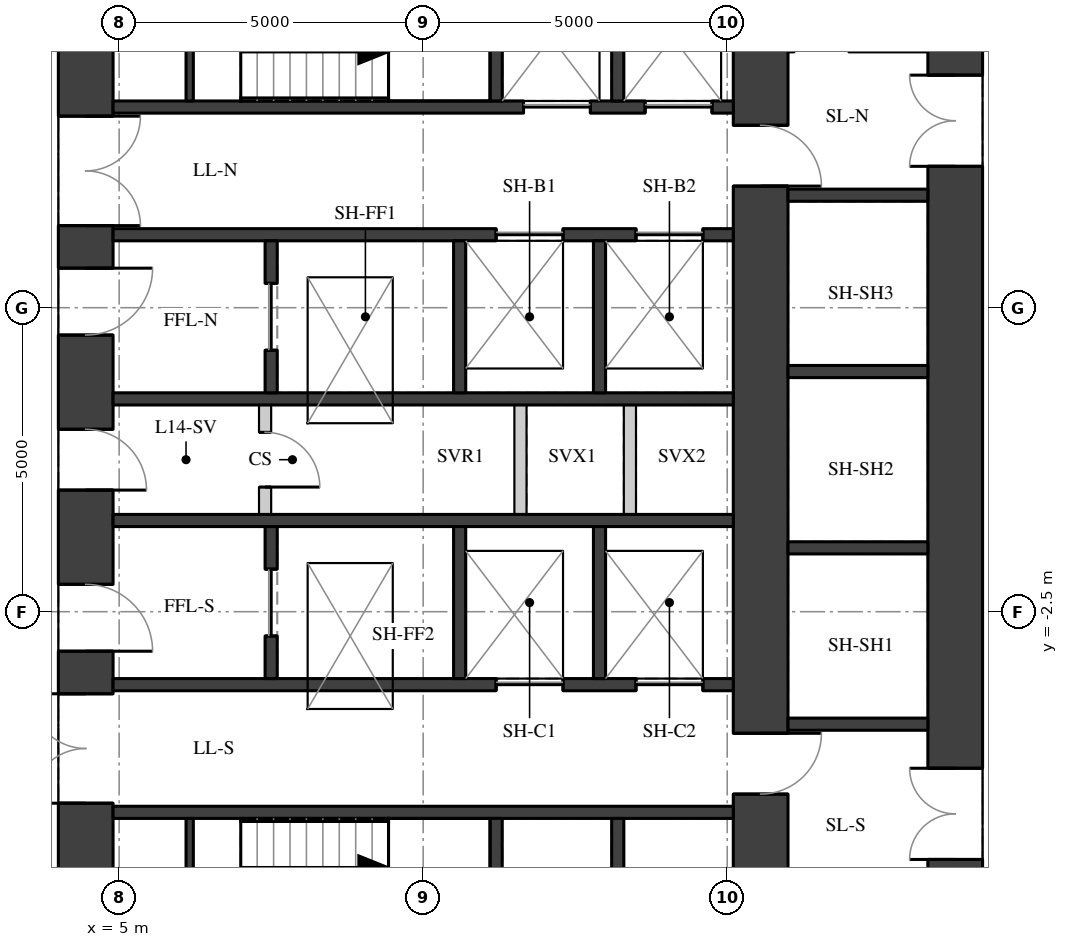
"""IFC4 building model, lengths in metres.
Left out: names, types, materials, properties, quantities, classifications, styles, units other than length and angle.
Written with IfcOpenShell. Run it as: python <this file> out.ifc"""

import sys

from ifc_helpers import new_model, si_unit, direction, frame, frame_2d, origin, place, context, subcontext, project, spatial, rectangle, extrude, element, fill, save


model = new_model("IFC4")
c1 = context("Model", 3, precision=1e-05, world=origin(), true_north=direction((0.0, 1.0)))
c2 = subcontext(c1, "Body", "Model", "MODEL_VIEW")
j1 = project(units=[si_unit("LENGTHUNIT", "METRE"), si_unit("PLANEANGLEUNIT", "RADIAN")], contexts=[c1])
p1 = place(None, origin())
s1 = spatial("IfcSite", under=j1, at=p1, CompositionType="ELEMENT")
p2 = place(p1, origin())
s2 = spatial("IfcBuilding", under=s1, at=p2, CompositionType="ELEMENT")
p3 = place(p2, frame((0.0, 0.0, 54.7)))
s3 = spatial("IfcBuildingStorey", under=s2, at=p3, CompositionType="ELEMENT", Elevation=54.7)
p4 = place(p3, frame((4.45, -11.1, 0.0), z_axis=(0.0, 0.0, 1.0), x_axis=(0.0, 1.0, 0.0)))
e1 = element("IfcWall", 1, at=p4, inside=s3, PredefinedType="SHEAR", context=c2, shape_type="SweptSolid", body=[
    extrude(rectangle(XDim=22.2, YDim=0.9, at=frame_2d((11.1, 0.0))), origin(), (0.0, 0.0, 1.0), 3.02),
])
p5 = place(p4, frame((2.35, 0.0, 0.0)))
e2 = element("IfcOpeningElement", 2, at=p5, cuts=e1, PredefinedType="OPENING", context=c2, shape_type="SweptSolid", body=[
    extrude(rectangle(XDim=1.5, YDim=2.1, at=frame_2d((0.75, 1.05))), frame((0.0, 0.46, 0.0), z_axis=(0.0, -1.0, 0.0), x_axis=(1.0, 0.0, 0.0)), (0.0, 0.0, 1.0), 0.92),
])
p6 = place(p4, frame((5.45, 0.0, 0.0)))
e3 = element("IfcOpeningElement", 3, at=p6, cuts=e1, PredefinedType="OPENING", context=c2, shape_type="SweptSolid", body=[
    extrude(rectangle(XDim=1.8, YDim=2.1, at=frame_2d((0.9, 1.05))), frame((0.0, 0.46, 0.0), z_axis=(0.0, -1.0, 0.0), x_axis=(1.0, 0.0, 0.0)), (0.0, 0.0, 1.0), 0.92),
])
p7 = place(p4, frame((7.95, 0.0, 0.0)))
e4 = element("IfcOpeningElement", 4, at=p7, cuts=e1, PredefinedType="OPENING", context=c2, shape_type="SweptSolid", body=[
    extrude(rectangle(XDim=1.1, YDim=2.1, at=frame_2d((0.55, 1.05))), frame((0.0, 0.46, 0.0), z_axis=(0.0, -1.0, 0.0), x_axis=(1.0, 0.0, 0.0)), (0.0, 0.0, 1.0), 0.92),
])
p8 = place(p4, frame((10.6, 0.0, 0.0)))
e5 = element("IfcOpeningElement", 5, at=p8, cuts=e1, PredefinedType="OPENING", context=c2, shape_type="SweptSolid", body=[
    extrude(rectangle(XDim=1.0, YDim=2.1, at=frame_2d((0.5, 1.05))), frame((0.0, 0.46, 0.0), z_axis=(0.0, -1.0, 0.0), x_axis=(1.0, 0.0, 0.0)), (0.0, 0.0, 1.0), 0.92),
])
p9 = place(p4, frame((13.15, 0.0, 0.0)))
e6 = element("IfcOpeningElement", 6, at=p9, cuts=e1, PredefinedType="OPENING", context=c2, shape_type="SweptSolid", body=[
    extrude(rectangle(XDim=1.1, YDim=2.1, at=frame_2d((0.55, 1.05))), frame((0.0, 0.46, 0.0), z_axis=(0.0, -1.0, 0.0), x_axis=(1.0, 0.0, 0.0)), (0.0, 0.0, 1.0), 0.92),
])
p10 = place(p4, frame((14.95, 0.0, 0.0)))
e7 = element("IfcOpeningElement", 7, at=p10, cuts=e1, PredefinedType="OPENING", context=c2, shape_type="SweptSolid", body=[
    extrude(rectangle(XDim=1.8, YDim=2.1, at=frame_2d((0.9, 1.05))), frame((0.0, 0.46, 0.0), z_axis=(0.0, -1.0, 0.0), x_axis=(1.0, 0.0, 0.0)), (0.0, 0.0, 1.0), 0.92),
])
p11 = place(p4, frame((18.35, 0.0, 0.0)))
e8 = element("IfcOpeningElement", 8, at=p11, cuts=e1, PredefinedType="OPENING", context=c2, shape_type="SweptSolid", body=[
    extrude(rectangle(XDim=1.5, YDim=2.1, at=frame_2d((0.75, 1.05))), frame((0.0, 0.46, 0.0), z_axis=(0.0, -1.0, 0.0), x_axis=(1.0, 0.0, 0.0)), (0.0, 0.0, 1.0), 0.92),
])
p12 = place(p3, frame((18.75, -11.1, 0.0), z_axis=(0.0, 0.0, 1.0), x_axis=(0.0, 1.0, 0.0)))
e9 = element("IfcWall", 9, at=p12, inside=s3, PredefinedType="SHEAR", context=c2, shape_type="SweptSolid", body=[
    extrude(rectangle(XDim=22.2, YDim=0.9, at=frame_2d((11.1, 0.0))), origin(), (0.0, 0.0, 1.0), 3.02),
])
p13 = place(p12, frame((15.925, 0.0, 0.0)))
e10 = element("IfcOpeningElement", 10, at=p13, cuts=e9, PredefinedType="OPENING", context=c2, shape_type="SweptSolid", body=[
    extrude(rectangle(XDim=1.5, YDim=2.1, at=frame_2d((0.75, 1.05))), frame((0.0, 0.46, 0.0), z_axis=(0.0, -1.0, 0.0), x_axis=(1.0, 0.0, 0.0)), (0.0, 0.0, 1.0), 0.92),
])
p14 = place(p12, frame((4.525, 0.0, 0.0)))
e11 = element("IfcOpeningElement", 11, at=p14, cuts=e9, PredefinedType="OPENING", context=c2, shape_type="SweptSolid", body=[
    extrude(rectangle(XDim=1.5, YDim=2.1, at=frame_2d((0.75, 1.05))), frame((0.0, 0.46, 0.0), z_axis=(0.0, -1.0, 0.0), x_axis=(1.0, 0.0, 0.0)), (0.0, 0.0, 1.0), 0.92),
])
p15 = place(p3, frame((15.55, -11.1, 0.0), z_axis=(0.0, 0.0, 1.0), x_axis=(0.0, 1.0, 0.0)))
e12 = element("IfcWall", 12, at=p15, inside=s3, PredefinedType="SHEAR", context=c2, shape_type="SweptSolid", body=[
    extrude(rectangle(XDim=22.2, YDim=0.9, at=frame_2d((11.1, 0.0))), origin(), (0.0, 0.0, 1.0), 3.02),
])
p16 = place(p15, frame((15.6, 0.0, 0.0)))
e13 = element("IfcOpeningElement", 13, at=p16, cuts=e12, PredefinedType="OPENING", context=c2, shape_type="SweptSolid", body=[
    extrude(rectangle(XDim=1.0, YDim=2.1, at=frame_2d((0.5, 1.05))), frame((0.0, 0.46, 0.0), z_axis=(0.0, -1.0, 0.0), x_axis=(1.0, 0.0, 0.0)), (0.0, 0.0, 1.0), 0.92),
])
p17 = place(p15, frame((5.6, 0.0, 0.0)))
e14 = element("IfcOpeningElement", 14, at=p17, cuts=e12, PredefinedType="OPENING", context=c2, shape_type="SweptSolid", body=[
    extrude(rectangle(XDim=1.0, YDim=2.1, at=frame_2d((0.5, 1.05))), frame((0.0, 0.46, 0.0), z_axis=(0.0, -1.0, 0.0), x_axis=(1.0, 0.0, 0.0)), (0.0, 0.0, 1.0), 0.92),
])
p18 = place(p3, frame((4.9, 5.8, 0.0), z_axis=(0.0, 0.0, 1.0), x_axis=(1.0, 0.0, 0.0)))
e15 = element("IfcWall", 15, at=p18, inside=s3, PredefinedType="SHEAR", context=c2, shape_type="SweptSolid", body=[
    extrude(rectangle(XDim=10.2, YDim=0.2, at=frame_2d((5.1, 0.0))), origin(), (0.0, 0.0, 1.0), 3.02),
])
p19 = place(p18, frame((6.75, 0.0, 0.0)))
e16 = element("IfcOpeningElement", 16, at=p19, cuts=e15, PredefinedType="OPENING", context=c2, shape_type="SweptSolid", body=[
    extrude(rectangle(XDim=1.1, YDim=2.1, at=frame_2d((0.55, 1.05))), frame((0.0, 0.11, 0.0), z_axis=(0.0, -1.0, 0.0), x_axis=(1.0, 0.0, 0.0)), (0.0, 0.0, 1.0), 0.22),
])
p20 = place(p18, frame((8.75, 0.0, 0.0)))
e17 = element("IfcOpeningElement", 17, at=p20, cuts=e15, PredefinedType="OPENING", context=c2, shape_type="SweptSolid", body=[
    extrude(rectangle(XDim=1.1, YDim=2.1, at=frame_2d((0.55, 1.05))), frame((0.0, 0.11, 0.0), z_axis=(0.0, -1.0, 0.0), x_axis=(1.0, 0.0, 0.0)), (0.0, 0.0, 1.0), 0.22),
])
p21 = place(p3, frame((4.9, 3.7, 0.0), z_axis=(0.0, 0.0, 1.0), x_axis=(1.0, 0.0, 0.0)))
e18 = element("IfcWall", 18, at=p21, inside=s3, PredefinedType="SHEAR", context=c2, shape_type="SweptSolid", body=[
    extrude(rectangle(XDim=10.2, YDim=0.2, at=frame_2d((5.1, 0.0))), origin(), (0.0, 0.0, 1.0), 3.02),
])
p22 = place(p21, frame((6.3, 0.0, 0.0)))
e19 = element("IfcOpeningElement", 19, at=p22, cuts=e18, PredefinedType="OPENING", context=c2, shape_type="SweptSolid", body=[
    extrude(rectangle(XDim=1.1, YDim=2.1, at=frame_2d((0.55, 1.05))), frame((0.0, 0.11, 0.0), z_axis=(0.0, -1.0, 0.0), x_axis=(1.0, 0.0, 0.0)), (0.0, 0.0, 1.0), 0.22),
])
p23 = place(p21, frame((8.6, 0.0, 0.0)))
e20 = element("IfcOpeningElement", 20, at=p23, cuts=e18, PredefinedType="OPENING", context=c2, shape_type="SweptSolid", body=[
    extrude(rectangle(XDim=1.1, YDim=2.1, at=frame_2d((0.55, 1.05))), frame((0.0, 0.11, 0.0), z_axis=(0.0, -1.0, 0.0), x_axis=(1.0, 0.0, 0.0)), (0.0, 0.0, 1.0), 0.22),
])
for number, where, z_axis, x_axis in (
    (21, (4.9, 1.0, 0.0), (0.0, 0.0, 1.0), (1.0, 0.0, 0.0)),
    (22, (4.9, -1.0, 0.0), (0.0, 0.0, 1.0), (1.0, 0.0, 0.0)),
):
    element("IfcWall", number, at=place(p3, frame(where, z_axis=z_axis, x_axis=x_axis)), inside=s3, PredefinedType="SHEAR", context=c2, shape_type="SweptSolid", body=[
        extrude(rectangle(XDim=10.2, YDim=0.2, at=frame_2d((5.1, 0.0))), origin(), (0.0, 0.0, 1.0), 3.02),
    ])
p24 = place(p3, frame((4.9, -3.7, 0.0), z_axis=(0.0, 0.0, 1.0), x_axis=(1.0, 0.0, 0.0)))
e23 = element("IfcWall", 23, at=p24, inside=s3, PredefinedType="SHEAR", context=c2, shape_type="SweptSolid", body=[
    extrude(rectangle(XDim=10.2, YDim=0.2, at=frame_2d((5.1, 0.0))), origin(), (0.0, 0.0, 1.0), 3.02),
])
p25 = place(p24, frame((6.3, 0.0, 0.0)))
e24 = element("IfcOpeningElement", 24, at=p25, cuts=e23, PredefinedType="OPENING", context=c2, shape_type="SweptSolid", body=[
    extrude(rectangle(XDim=1.1, YDim=2.1, at=frame_2d((0.55, 1.05))), frame((0.0, 0.11, 0.0), z_axis=(0.0, -1.0, 0.0), x_axis=(1.0, 0.0, 0.0)), (0.0, 0.0, 1.0), 0.22),
])
p26 = place(p24, frame((8.6, 0.0, 0.0)))
e25 = element("IfcOpeningElement", 25, at=p26, cuts=e23, PredefinedType="OPENING", context=c2, shape_type="SweptSolid", body=[
    extrude(rectangle(XDim=1.1, YDim=2.1, at=frame_2d((0.55, 1.05))), frame((0.0, 0.11, 0.0), z_axis=(0.0, -1.0, 0.0), x_axis=(1.0, 0.0, 0.0)), (0.0, 0.0, 1.0), 0.22),
])
p27 = place(p3, frame((4.9, -5.8, 0.0), z_axis=(0.0, 0.0, 1.0), x_axis=(1.0, 0.0, 0.0)))
e26 = element("IfcWall", 26, at=p27, inside=s3, PredefinedType="SHEAR", context=c2, shape_type="SweptSolid", body=[
    extrude(rectangle(XDim=10.2, YDim=0.2, at=frame_2d((5.1, 0.0))), origin(), (0.0, 0.0, 1.0), 3.02),
])
for number, where, z_axis, x_axis in (
    (27, (11.2, 5.9, 0.0), (0.0, 0.0, 1.0), (0.0, 1.0, 0.0)),
    (28, (11.2, -9.1, 0.0), (0.0, 0.0, 1.0), (0.0, 1.0, 0.0)),
    (29, (13.2, 5.9, 0.0), (0.0, 0.0, 1.0), (0.0, 1.0, 0.0)),
    (30, (13.2, -9.1, 0.0), (0.0, 0.0, 1.0), (0.0, 1.0, 0.0)),
):
    element("IfcWall", number, at=place(p3, frame(where, z_axis=z_axis, x_axis=x_axis)), inside=s3, PredefinedType="SHEAR", context=c2, shape_type="SweptSolid", body=[
        extrude(rectangle(XDim=3.2, YDim=0.2, at=frame_2d((1.6, 0.0))), origin(), (0.0, 0.0, 1.0), 3.02),
    ])
p28 = place(p3, frame((7.5, 1.1, 0.0), z_axis=(0.0, 0.0, 1.0), x_axis=(0.0, 1.0, 0.0)))
e31 = element("IfcWall", 31, at=p28, inside=s3, PredefinedType="SHEAR", context=c2, shape_type="SweptSolid", body=[
    extrude(rectangle(XDim=2.5, YDim=0.2, at=frame_2d((1.25, 0.0))), origin(), (0.0, 0.0, 1.0), 3.02),
])
p29 = place(p28, frame((0.7, 0.0, 0.0)))
e32 = element("IfcOpeningElement", 32, at=p29, cuts=e31, PredefinedType="OPENING", context=c2, shape_type="SweptSolid", body=[
    extrude(rectangle(XDim=1.1, YDim=2.1, at=frame_2d((0.55, 1.05))), frame((0.0, 0.11, 0.0), z_axis=(0.0, -1.0, 0.0), x_axis=(1.0, 0.0, 0.0)), (0.0, 0.0, 1.0), 0.22),
])
p30 = place(p3, frame((7.5, -3.6, 0.0), z_axis=(0.0, 0.0, 1.0), x_axis=(0.0, 1.0, 0.0)))
e33 = element("IfcWall", 33, at=p30, inside=s3, PredefinedType="SHEAR", context=c2, shape_type="SweptSolid", body=[
    extrude(rectangle(XDim=2.5, YDim=0.2, at=frame_2d((1.25, 0.0))), origin(), (0.0, 0.0, 1.0), 3.02),
])
p31 = place(p30, frame((0.7, 0.0, 0.0)))
e34 = element("IfcOpeningElement", 34, at=p31, cuts=e33, PredefinedType="OPENING", context=c2, shape_type="SweptSolid", body=[
    extrude(rectangle(XDim=1.1, YDim=2.1, at=frame_2d((0.55, 1.05))), frame((0.0, 0.11, 0.0), z_axis=(0.0, -1.0, 0.0), x_axis=(1.0, 0.0, 0.0)), (0.0, 0.0, 1.0), 0.22),
])
for number, where, z_axis, x_axis in (
    (35, (10.6, 1.1, 0.0), (0.0, 0.0, 1.0), (0.0, 1.0, 0.0)),
    (36, (10.6, -3.6, 0.0), (0.0, 0.0, 1.0), (0.0, 1.0, 0.0)),
    (37, (12.9, 1.1, 0.0), (0.0, 0.0, 1.0), (0.0, 1.0, 0.0)),
    (38, (12.9, -3.6, 0.0), (0.0, 0.0, 1.0), (0.0, 1.0, 0.0)),
):
    element("IfcWall", number, at=place(p3, frame(where, z_axis=z_axis, x_axis=x_axis)), inside=s3, PredefinedType="SHEAR", context=c2, shape_type="SweptSolid", body=[
        extrude(rectangle(XDim=2.5, YDim=0.2, at=frame_2d((1.25, 0.0))), origin(), (0.0, 0.0, 1.0), 3.02),
    ])
p32 = place(p3, frame((6.16, 5.9, 0.0), z_axis=(0.0, 0.0, 1.0), x_axis=(0.0, 1.0, 0.0)))
e39 = element("IfcWall", 39, at=p32, inside=s3, PredefinedType="SHEAR", context=c2, shape_type="SweptSolid", body=[
    extrude(rectangle(XDim=3.2, YDim=0.12, at=frame_2d((1.6, 0.0))), origin(), (0.0, 0.0, 1.0), 3.02),
])
p33 = place(p32, frame((0.85, 0.0, 0.0)))
e40 = element("IfcOpeningElement", 40, at=p33, cuts=e39, PredefinedType="OPENING", context=c2, shape_type="SweptSolid", body=[
    extrude(rectangle(XDim=1.5, YDim=2.1, at=frame_2d((0.75, 1.05))), frame((0.0, 0.07, 0.0), z_axis=(0.0, -1.0, 0.0), x_axis=(1.0, 0.0, 0.0)), (0.0, 0.0, 1.0), 0.14),
])
p34 = place(p3, frame((6.16, -9.1, 0.0), z_axis=(0.0, 0.0, 1.0), x_axis=(0.0, 1.0, 0.0)))
e41 = element("IfcWall", 41, at=p34, inside=s3, PredefinedType="SHEAR", context=c2, shape_type="SweptSolid", body=[
    extrude(rectangle(XDim=3.2, YDim=0.12, at=frame_2d((1.6, 0.0))), origin(), (0.0, 0.0, 1.0), 3.02),
])
p35 = place(p34, frame((0.85, 0.0, 0.0)))
e42 = element("IfcOpeningElement", 42, at=p35, cuts=e41, PredefinedType="OPENING", context=c2, shape_type="SweptSolid", body=[
    extrude(rectangle(XDim=1.5, YDim=2.1, at=frame_2d((0.75, 1.05))), frame((0.0, 0.07, 0.0), z_axis=(0.0, -1.0, 0.0), x_axis=(1.0, 0.0, 0.0)), (0.0, 0.0, 1.0), 0.14),
])
p36 = place(p3, frame((7.4, -0.9, 0.0), z_axis=(0.0, 0.0, 1.0), x_axis=(0.0, 1.0, 0.0)))
e43 = element("IfcWall", 43, at=p36, inside=s3, PredefinedType="PARTITIONING", context=c2, shape_type="SweptSolid", body=[
    extrude(rectangle(XDim=1.8, YDim=0.2, at=frame_2d((0.9, 0.0))), origin(), (0.0, 0.0, 1.0), 3.02),
])
p37 = place(p36, frame((0.45, 0.0, 0.0)))
e44 = element("IfcOpeningElement", 44, at=p37, cuts=e43, PredefinedType="OPENING", context=c2, shape_type="SweptSolid", body=[
    extrude(rectangle(XDim=0.9, YDim=2.1, at=frame_2d((0.45, 1.05))), frame((0.0, 0.11, 0.0), z_axis=(0.0, -1.0, 0.0), x_axis=(1.0, 0.0, 0.0)), (0.0, 0.0, 1.0), 0.22),
])
for number, where, z_axis, x_axis in (
    (45, (11.6, -0.9, 0.0), (0.0, 0.0, 1.0), (0.0, 1.0, 0.0)),
    (46, (13.4, -0.9, 0.0), (0.0, 0.0, 1.0), (0.0, 1.0, 0.0)),
):
    element("IfcWall", number, at=place(p3, frame(where, z_axis=z_axis, x_axis=x_axis)), inside=s3, PredefinedType="PARTITIONING", context=c2, shape_type="SweptSolid", body=[
        extrude(rectangle(XDim=1.8, YDim=0.2, at=frame_2d((0.9, 0.0))), origin(), (0.0, 0.0, 1.0), 3.02),
    ])
for number, where, z_axis, x_axis in (
    (47, (16.0, -4.35, 0.0), (0.0, 0.0, 1.0), (1.0, 0.0, 0.0)),
    (48, (16.0, -1.45, 0.0), (0.0, 0.0, 1.0), (1.0, 0.0, 0.0)),
    (49, (16.0, 1.45, 0.0), (0.0, 0.0, 1.0), (1.0, 0.0, 0.0)),
    (50, (16.0, 4.35, 0.0), (0.0, 0.0, 1.0), (1.0, 0.0, 0.0)),
):
    element("IfcWall", number, at=place(p3, frame(where, z_axis=z_axis, x_axis=x_axis)), inside=s3, PredefinedType="SHEAR", context=c2, shape_type="SweptSolid", body=[
        extrude(rectangle(XDim=2.3, YDim=0.2, at=frame_2d((1.15, 0.0))), origin(), (0.0, 0.0, 1.0), 3.02),
    ])
p38 = place(p6, origin())
e51 = element("IfcDoor", 51, at=p38, inside=s3, OperationType="DOUBLE_DOOR_SINGLE_SWING", PredefinedType="DOOR", context=c2, shape_type="SweptSolid", body=[
    extrude(rectangle(XDim=1.8, YDim=2.1, at=frame_2d((0.9, 1.05))), frame((0.0, 0.025, 0.0), z_axis=(0.0, -1.0, 0.0), x_axis=(1.0, 0.0, 0.0)), (0.0, 0.0, 1.0), 0.05),
])
fill(e3, e51)
p39 = place(p7, origin())
e52 = element("IfcDoor", 52, at=p39, inside=s3, OperationType="SINGLE_SWING_RIGHT", PredefinedType="DOOR", context=c2, shape_type="SweptSolid", body=[
    extrude(rectangle(XDim=1.1, YDim=2.1, at=frame_2d((0.55, 1.05))), frame((0.0, 0.025, 0.0), z_axis=(0.0, -1.0, 0.0), x_axis=(1.0, 0.0, 0.0)), (0.0, 0.0, 1.0), 0.05),
])
fill(e4, e52)
p40 = place(p8, origin())
e53 = element("IfcDoor", 53, at=p40, inside=s3, OperationType="SINGLE_SWING_RIGHT", PredefinedType="DOOR", context=c2, shape_type="SweptSolid", body=[
    extrude(rectangle(XDim=1.0, YDim=2.1, at=frame_2d((0.5, 1.05))), frame((0.0, 0.025, 0.0), z_axis=(0.0, -1.0, 0.0), x_axis=(1.0, 0.0, 0.0)), (0.0, 0.0, 1.0), 0.05),
])
fill(e5, e53)
p41 = place(p9, origin())
e54 = element("IfcDoor", 54, at=p41, inside=s3, OperationType="SINGLE_SWING_LEFT", PredefinedType="DOOR", context=c2, shape_type="SweptSolid", body=[
    extrude(rectangle(XDim=1.1, YDim=2.1, at=frame_2d((0.55, 1.05))), frame((0.0, 0.025, 0.0), z_axis=(0.0, -1.0, 0.0), x_axis=(1.0, 0.0, 0.0)), (0.0, 0.0, 1.0), 0.05),
])
fill(e6, e54)
p42 = place(p10, origin())
e55 = element("IfcDoor", 55, at=p42, inside=s3, OperationType="DOUBLE_DOOR_SINGLE_SWING", PredefinedType="DOOR", context=c2, shape_type="SweptSolid", body=[
    extrude(rectangle(XDim=1.8, YDim=2.1, at=frame_2d((0.9, 1.05))), frame((0.0, 0.025, 0.0), z_axis=(0.0, -1.0, 0.0), x_axis=(1.0, 0.0, 0.0)), (0.0, 0.0, 1.0), 0.05),
])
fill(e7, e55)
p43 = place(p13, origin())
e56 = element("IfcDoor", 56, at=p43, inside=s3, OperationType="DOUBLE_DOOR_SINGLE_SWING", PredefinedType="DOOR", context=c2, shape_type="SweptSolid", body=[
    extrude(rectangle(XDim=1.5, YDim=2.1, at=frame_2d((0.75, 1.05))), frame((0.0, 0.025, 0.0), z_axis=(0.0, -1.0, 0.0), x_axis=(1.0, 0.0, 0.0)), (0.0, 0.0, 1.0), 0.05),
])
fill(e10, e56)
p44 = place(p14, origin())
e57 = element("IfcDoor", 57, at=p44, inside=s3, OperationType="DOUBLE_DOOR_SINGLE_SWING", PredefinedType="DOOR", context=c2, shape_type="SweptSolid", body=[
    extrude(rectangle(XDim=1.5, YDim=2.1, at=frame_2d((0.75, 1.05))), frame((0.0, 0.025, 0.0), z_axis=(0.0, -1.0, 0.0), x_axis=(1.0, 0.0, 0.0)), (0.0, 0.0, 1.0), 0.05),
])
fill(e11, e57)
p45 = place(p19, origin())
e58 = element("IfcDoor", 58, at=p45, inside=s3, OperationType="DOUBLE_DOOR_SLIDING", PredefinedType="DOOR", context=c2, shape_type="SweptSolid", body=[
    extrude(rectangle(XDim=1.1, YDim=2.1, at=frame_2d((0.55, 1.05))), frame((0.0, 0.025, 0.0), z_axis=(0.0, -1.0, 0.0), x_axis=(1.0, 0.0, 0.0)), (0.0, 0.0, 1.0), 0.05),
])
fill(e16, e58)
p46 = place(p20, origin())
e59 = element("IfcDoor", 59, at=p46, inside=s3, OperationType="DOUBLE_DOOR_SLIDING", PredefinedType="DOOR", context=c2, shape_type="SweptSolid", body=[
    extrude(rectangle(XDim=1.1, YDim=2.1, at=frame_2d((0.55, 1.05))), frame((0.0, 0.025, 0.0), z_axis=(0.0, -1.0, 0.0), x_axis=(1.0, 0.0, 0.0)), (0.0, 0.0, 1.0), 0.05),
])
fill(e17, e59)
p47 = place(p22, origin())
e60 = element("IfcDoor", 60, at=p47, inside=s3, OperationType="DOUBLE_DOOR_SLIDING", PredefinedType="DOOR", context=c2, shape_type="SweptSolid", body=[
    extrude(rectangle(XDim=1.1, YDim=2.1, at=frame_2d((0.55, 1.05))), frame((0.0, 0.025, 0.0), z_axis=(0.0, -1.0, 0.0), x_axis=(1.0, 0.0, 0.0)), (0.0, 0.0, 1.0), 0.05),
])
fill(e19, e60)
p48 = place(p23, origin())
e61 = element("IfcDoor", 61, at=p48, inside=s3, OperationType="DOUBLE_DOOR_SLIDING", PredefinedType="DOOR", context=c2, shape_type="SweptSolid", body=[
    extrude(rectangle(XDim=1.1, YDim=2.1, at=frame_2d((0.55, 1.05))), frame((0.0, 0.025, 0.0), z_axis=(0.0, -1.0, 0.0), x_axis=(1.0, 0.0, 0.0)), (0.0, 0.0, 1.0), 0.05),
])
fill(e20, e61)
p49 = place(p25, origin())
e62 = element("IfcDoor", 62, at=p49, inside=s3, OperationType="DOUBLE_DOOR_SLIDING", PredefinedType="DOOR", context=c2, shape_type="SweptSolid", body=[
    extrude(rectangle(XDim=1.1, YDim=2.1, at=frame_2d((0.55, 1.05))), frame((0.0, 0.025, 0.0), z_axis=(0.0, -1.0, 0.0), x_axis=(1.0, 0.0, 0.0)), (0.0, 0.0, 1.0), 0.05),
])
fill(e24, e62)
p50 = place(p26, origin())
e63 = element("IfcDoor", 63, at=p50, inside=s3, OperationType="DOUBLE_DOOR_SLIDING", PredefinedType="DOOR", context=c2, shape_type="SweptSolid", body=[
    extrude(rectangle(XDim=1.1, YDim=2.1, at=frame_2d((0.55, 1.05))), frame((0.0, 0.025, 0.0), z_axis=(0.0, -1.0, 0.0), x_axis=(1.0, 0.0, 0.0)), (0.0, 0.0, 1.0), 0.05),
])
fill(e25, e63)
p51 = place(p29, origin())
e64 = element("IfcDoor", 64, at=p51, inside=s3, OperationType="DOUBLE_DOOR_SLIDING", PredefinedType="DOOR", context=c2, shape_type="SweptSolid", body=[
    extrude(rectangle(XDim=1.1, YDim=2.1, at=frame_2d((0.55, 1.05))), frame((0.0, 0.025, 0.0), z_axis=(0.0, -1.0, 0.0), x_axis=(1.0, 0.0, 0.0)), (0.0, 0.0, 1.0), 0.05),
])
fill(e32, e64)
p52 = place(p31, origin())
e65 = element("IfcDoor", 65, at=p52, inside=s3, OperationType="DOUBLE_DOOR_SLIDING", PredefinedType="DOOR", context=c2, shape_type="SweptSolid", body=[
    extrude(rectangle(XDim=1.1, YDim=2.1, at=frame_2d((0.55, 1.05))), frame((0.0, 0.025, 0.0), z_axis=(0.0, -1.0, 0.0), x_axis=(1.0, 0.0, 0.0)), (0.0, 0.0, 1.0), 0.05),
])
fill(e34, e65)
p53 = place(p37, origin())
e66 = element("IfcDoor", 66, at=p53, inside=s3, OperationType="SINGLE_SWING_RIGHT", PredefinedType="DOOR", context=c2, shape_type="SweptSolid", body=[
    extrude(rectangle(XDim=0.9, YDim=2.1, at=frame_2d((0.45, 1.05))), frame((0.0, 0.025, 0.0), z_axis=(0.0, -1.0, 0.0), x_axis=(1.0, 0.0, 0.0)), (0.0, 0.0, 1.0), 0.05),
])
fill(e44, e66)
p54 = place(p16, origin())
e67 = element("IfcDoor", 67, at=p54, inside=s3, OperationType="SINGLE_SWING_RIGHT", PredefinedType="DOOR", context=c2, shape_type="SweptSolid", body=[
    extrude(rectangle(XDim=1.0, YDim=2.1, at=frame_2d((0.5, 1.05))), frame((0.0, 0.025, 0.0), z_axis=(0.0, -1.0, 0.0), x_axis=(1.0, 0.0, 0.0)), (0.0, 0.0, 1.0), 0.05),
])
fill(e13, e67)
p55 = place(p17, origin())
e68 = element("IfcDoor", 68, at=p55, inside=s3, OperationType="SINGLE_SWING_LEFT", PredefinedType="DOOR", context=c2, shape_type="SweptSolid", body=[
    extrude(rectangle(XDim=1.0, YDim=2.1, at=frame_2d((0.5, 1.05))), frame((0.0, 0.025, 0.0), z_axis=(0.0, -1.0, 0.0), x_axis=(1.0, 0.0, 0.0)), (0.0, 0.0, 1.0), 0.05),
])
fill(e14, e68)
save(model, sys.argv[1])
